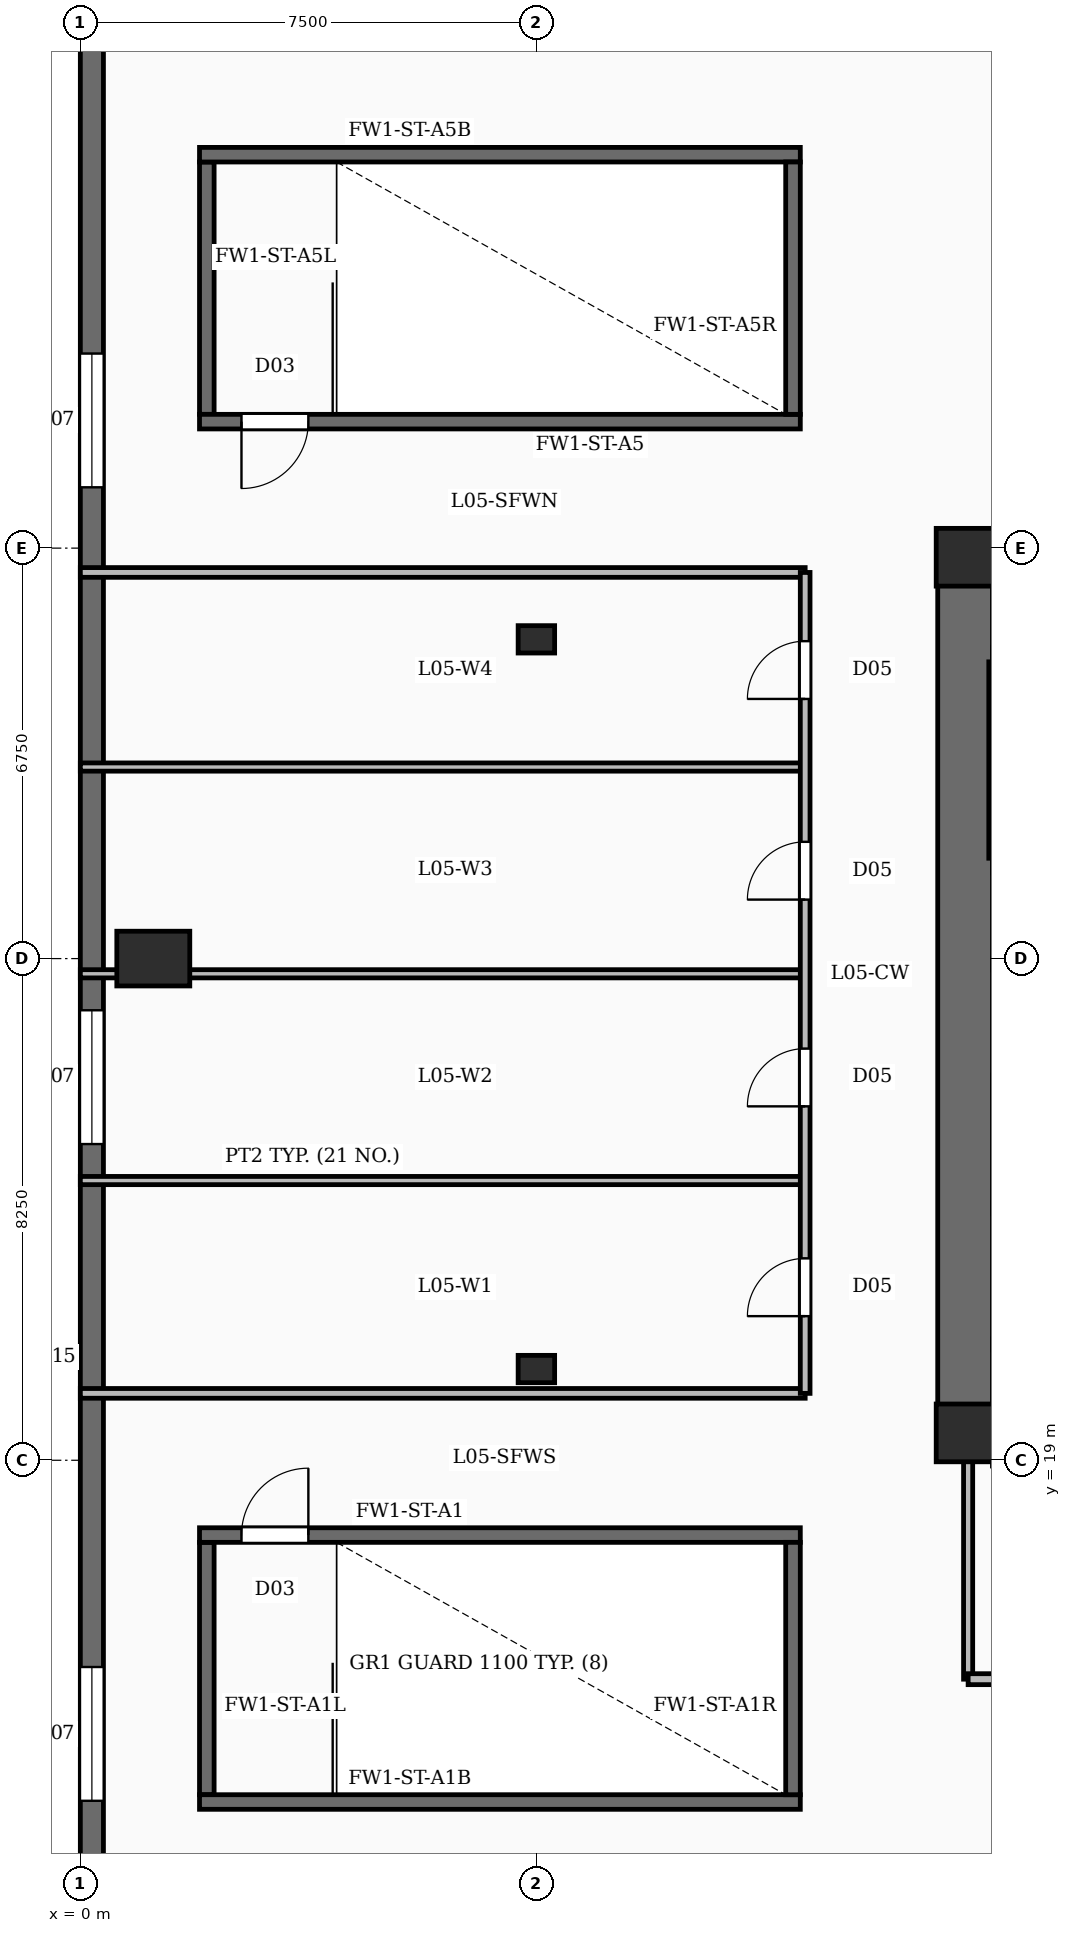
"""IFC4 building model, lengths in metres.
Left out: names, types, materials, properties, quantities, classifications, styles, units other than length and angle.
Written with IfcOpenShell. Run it as: python <this file> out.ifc"""

import sys

from ifc_helpers import new_model, si_unit, direction, frame, frame_2d, origin, origin_2d, place, context, subcontext, project, spatial, rectangle, extrude, element, fill, save


model = new_model("IFC4")
c1 = context("Model", 3, precision=1e-05, world=origin(), true_north=direction((0.0, 1.0)))
c2 = subcontext(c1, "Body", "Model", "MODEL_VIEW")
j1 = project(units=[si_unit("LENGTHUNIT", "METRE"), si_unit("PLANEANGLEUNIT", "RADIAN")], contexts=[c1])
p1 = place(None, origin())
s1 = spatial("IfcSite", under=j1, at=p1, CompositionType="ELEMENT")
p2 = place(p1, origin())
s2 = spatial("IfcBuilding", under=s1, at=p2, CompositionType="ELEMENT")
p3 = place(p2, frame((0.0, 0.0, 28.0)))
s3 = spatial("IfcBuildingStorey", under=s2, at=p3, CompositionType="ELEMENT", Elevation=28.0)
p4 = place(p3, frame((14.55, 19.0, -0.35), z_axis=(0.0, 0.0, 1.0), x_axis=(0.0, 1.0, 0.0)))
e1 = element("IfcWall", 1, at=p4, inside=s3, PredefinedType="SHEAR", context=c2, shape_type="SweptSolid", body=[
    extrude(rectangle(XDim=15.3, YDim=0.9, at=frame_2d((7.65, 0.0))), origin(), (0.0, 0.0, 1.0), 5.9),
])
for number, where, z_axis, x_axis in (
    (2, (14.55, 19.45, -0.35), (0.0, 0.0, 1.0), (1.0, 0.0, 0.0)),
    (3, (14.55, 33.85, -0.35), (0.0, 0.0, 1.0), (1.0, 0.0, 0.0)),
):
    element("IfcColumn", number, at=place(p3, frame(where, z_axis=z_axis, x_axis=x_axis)), inside=s3, PredefinedType="COLUMN", context=c2, shape_type="SweptSolid", body=[
        extrude(rectangle(XDim=0.95, YDim=0.95, at=origin_2d()), origin(), (0.0, 0.0, 1.0), 5.9),
    ])
p5 = place(p3, frame((1.2, 27.25, -0.35), z_axis=(0.0, 0.0, 1.0), x_axis=(1.0, 0.0, 0.0)))
e4 = element("IfcColumn", 4, at=p5, inside=s3, PredefinedType="COLUMN", context=c2, shape_type="SweptSolid", body=[
    extrude(rectangle(XDim=1.2, YDim=0.9, at=origin_2d()), origin(), (0.0, 0.0, 1.0), 5.9),
])
for number, where, z_axis, x_axis in (
    (5, (7.5, 20.5, -0.35), (0.0, 0.0, 1.0), (1.0, 0.0, 0.0)),
    (6, (7.5, 32.5, -0.35), (0.0, 0.0, 1.0), (1.0, 0.0, 0.0)),
):
    element("IfcColumn", number, at=place(p3, frame(where, z_axis=z_axis, x_axis=x_axis)), inside=s3, PredefinedType="PILASTER", context=c2, shape_type="SweptSolid", body=[
        extrude(rectangle(XDim=0.6, YDim=0.45, at=origin_2d()), origin(), (0.0, 0.0, 1.0), 5.9),
    ])
p6 = place(p3, frame((0.19, 5.4, 0.0), z_axis=(0.0, 0.0, 1.0), x_axis=(0.0, 1.0, 0.0)))
e7 = element("IfcWall", 7, at=p6, inside=s3, PredefinedType="SOLIDWALL", context=c2, shape_type="SweptSolid", body=[
    extrude(rectangle(XDim=43.7, YDim=0.38, at=frame_2d((21.85, 0.0))), origin(), (0.0, 0.0, 1.0), 5.55),
])
p7 = place(p6, frame((8.0, 0.0, 0.95)))
e8 = element("IfcOpeningElement", 8, at=p7, cuts=e7, PredefinedType="OPENING", context=c2, shape_type="SweptSolid", body=[
    extrude(rectangle(XDim=2.2, YDim=2.5, at=frame_2d((1.1, 1.25))), frame((0.0, 0.2, 0.0), z_axis=(0.0, -1.0, 0.0), x_axis=(1.0, 0.0, 0.0)), (0.0, 0.0, 1.0), 0.4),
])
p8 = place(p6, frame((18.8, 0.0, 0.95)))
e9 = element("IfcOpeningElement", 9, at=p8, cuts=e7, PredefinedType="OPENING", context=c2, shape_type="SweptSolid", body=[
    extrude(rectangle(XDim=2.2, YDim=2.5, at=frame_2d((1.1, 1.25))), frame((0.0, 0.2, 0.0), z_axis=(0.0, -1.0, 0.0), x_axis=(1.0, 0.0, 0.0)), (0.0, 0.0, 1.0), 0.4),
])
p9 = place(p6, frame((29.6, 0.0, 0.95)))
e10 = element("IfcOpeningElement", 10, at=p9, cuts=e7, PredefinedType="OPENING", context=c2, shape_type="SweptSolid", body=[
    extrude(rectangle(XDim=2.2, YDim=2.5, at=frame_2d((1.1, 1.25))), frame((0.0, 0.2, 0.0), z_axis=(0.0, -1.0, 0.0), x_axis=(1.0, 0.0, 0.0)), (0.0, 0.0, 1.0), 0.4),
])
p10 = place(p3, frame((1.96, 17.77, 0.0), z_axis=(0.0, 0.0, 1.0), x_axis=(1.0, 0.0, 0.0)))
e11 = element("IfcWall", 11, at=p10, inside=s3, PredefinedType="SOLIDWALL", context=c2, shape_type="SweptSolid", body=[
    extrude(rectangle(XDim=9.88, YDim=0.24, at=frame_2d((4.94, 0.0))), origin(), (0.0, 0.0, 1.0), 5.55),
])
p11 = place(p10, frame((0.69, 0.0, 0.0)))
e12 = element("IfcOpeningElement", 12, at=p11, cuts=e11, PredefinedType="OPENING", context=c2, shape_type="SweptSolid", body=[
    extrude(rectangle(XDim=1.1, YDim=2.15, at=frame_2d((0.55, 1.075))), frame((0.0, 0.13, 0.0), z_axis=(0.0, -1.0, 0.0), x_axis=(1.0, 0.0, 0.0)), (0.0, 0.0, 1.0), 0.26),
])
p12 = place(p3, frame((1.96, 13.38, 0.0), z_axis=(0.0, 0.0, 1.0), x_axis=(1.0, 0.0, 0.0)))
e13 = element("IfcWall", 13, at=p12, inside=s3, PredefinedType="SOLIDWALL", context=c2, shape_type="SweptSolid", body=[
    extrude(rectangle(XDim=9.88, YDim=0.24, at=frame_2d((4.94, 0.0))), origin(), (0.0, 0.0, 1.0), 5.55),
])
for number, where, z_axis, x_axis in (
    (14, (2.08, 13.5, 0.0), (0.0, 0.0, 1.0), (0.0, 1.0, 0.0)),
    (15, (11.72, 13.5, 0.0), (0.0, 0.0, 1.0), (0.0, 1.0, 0.0)),
):
    element("IfcWall", number, at=place(p3, frame(where, z_axis=z_axis, x_axis=x_axis)), inside=s3, PredefinedType="SOLIDWALL", context=c2, shape_type="SweptSolid", body=[
        extrude(rectangle(XDim=4.15, YDim=0.24, at=frame_2d((2.075, 0.0))), origin(), (0.0, 0.0, 1.0), 5.55),
    ])
p13 = place(p3, frame((11.84, 36.08, 0.0), z_axis=(0.0, 0.0, 1.0), x_axis=(-1.0, 0.0, 0.0)))
e16 = element("IfcWall", 16, at=p13, inside=s3, PredefinedType="SOLIDWALL", context=c2, shape_type="SweptSolid", body=[
    extrude(rectangle(XDim=9.88, YDim=0.24, at=frame_2d((4.94, 0.0))), origin(), (0.0, 0.0, 1.0), 5.55),
])
p14 = place(p13, frame((8.09, 0.0, 0.0)))
e17 = element("IfcOpeningElement", 17, at=p14, cuts=e16, PredefinedType="OPENING", context=c2, shape_type="SweptSolid", body=[
    extrude(rectangle(XDim=1.1, YDim=2.15, at=frame_2d((0.55, 1.075))), frame((0.0, 0.13, 0.0), z_axis=(0.0, -1.0, 0.0), x_axis=(1.0, 0.0, 0.0)), (0.0, 0.0, 1.0), 0.26),
])
p15 = place(p3, frame((1.96, 40.47, 0.0), z_axis=(0.0, 0.0, 1.0), x_axis=(1.0, 0.0, 0.0)))
e18 = element("IfcWall", 18, at=p15, inside=s3, PredefinedType="SOLIDWALL", context=c2, shape_type="SweptSolid", body=[
    extrude(rectangle(XDim=9.88, YDim=0.24, at=frame_2d((4.94, 0.0))), origin(), (0.0, 0.0, 1.0), 5.55),
])
for number, where, z_axis, x_axis in (
    (19, (2.08, 36.2, 0.0), (0.0, 0.0, 1.0), (0.0, 1.0, 0.0)),
    (20, (11.72, 36.2, 0.0), (0.0, 0.0, 1.0), (0.0, 1.0, 0.0)),
):
    element("IfcWall", number, at=place(p3, frame(where, z_axis=z_axis, x_axis=x_axis)), inside=s3, PredefinedType="SOLIDWALL", context=c2, shape_type="SweptSolid", body=[
        extrude(rectangle(XDim=4.15, YDim=0.24, at=frame_2d((2.075, 0.0))), origin(), (0.0, 0.0, 1.0), 5.55),
    ])
p16 = place(p3, frame((15.06, 28.9, 0.0), z_axis=(0.0, 0.0, 1.0), x_axis=(0.0, 1.0, 0.0)))
e21 = element("IfcWall", 21, at=p16, inside=s3, PredefinedType="SOLIDWALL", context=c2, shape_type="SweptSolid", body=[
    extrude(rectangle(XDim=3.23, YDim=0.24, at=frame_2d((1.615, 0.0))), origin(), (0.0, 0.0, 1.0), 5.55),
])
p17 = place(p3, frame((14.6, 15.4, 0.0), z_axis=(0.0, 0.0, 1.0), x_axis=(1.0, 0.0, 0.0)))
e22 = element("IfcWall", 22, at=p17, inside=s3, PredefinedType="PARTITIONING", context=c2, shape_type="SweptSolid", body=[
    extrude(rectangle(XDim=9.9, YDim=0.18, at=frame_2d((4.95, 0.0))), origin(), (0.0, 0.0, 1.0), 4.61),
])
p18 = place(p17, frame((0.74, 0.0, 0.0)))
e23 = element("IfcOpeningElement", 23, at=p18, cuts=e22, PredefinedType="OPENING", context=c2, shape_type="SweptSolid", body=[
    extrude(rectangle(XDim=0.92, YDim=2.1, at=frame_2d((0.46, 1.05))), frame((0.0, 0.1, 0.0), z_axis=(0.0, -1.0, 0.0), x_axis=(1.0, 0.0, 0.0)), (0.0, 0.0, 1.0), 0.2),
])
p19 = place(p17, frame((3.19, 0.0, 0.0)))
e24 = element("IfcOpeningElement", 24, at=p19, cuts=e22, PredefinedType="OPENING", context=c2, shape_type="SweptSolid", body=[
    extrude(rectangle(XDim=0.92, YDim=2.1, at=frame_2d((0.46, 1.05))), frame((0.0, 0.1, 0.0), z_axis=(0.0, -1.0, 0.0), x_axis=(1.0, 0.0, 0.0)), (0.0, 0.0, 1.0), 0.2),
])
p20 = place(p17, frame((5.69, 0.0, 0.0)))
e25 = element("IfcOpeningElement", 25, at=p20, cuts=e22, PredefinedType="OPENING", context=c2, shape_type="SweptSolid", body=[
    extrude(rectangle(XDim=0.92, YDim=2.1, at=frame_2d((0.46, 1.05))), frame((0.0, 0.1, 0.0), z_axis=(0.0, -1.0, 0.0), x_axis=(1.0, 0.0, 0.0)), (0.0, 0.0, 1.0), 0.2),
])
p21 = place(p17, frame((8.19, 0.0, 0.0)))
e26 = element("IfcOpeningElement", 26, at=p21, cuts=e22, PredefinedType="OPENING", context=c2, shape_type="SweptSolid", body=[
    extrude(rectangle(XDim=0.92, YDim=2.1, at=frame_2d((0.46, 1.05))), frame((0.0, 0.1, 0.0), z_axis=(0.0, -1.0, 0.0), x_axis=(1.0, 0.0, 0.0)), (0.0, 0.0, 1.0), 0.2),
])
p22 = place(p3, frame((14.6, 15.4, 0.0), z_axis=(0.0, 0.0, 1.0), x_axis=(0.0, 1.0, 0.0)))
e27 = element("IfcWall", 27, at=p22, inside=s3, PredefinedType="PARTITIONING", context=c2, shape_type="SweptSolid", body=[
    extrude(rectangle(XDim=3.58, YDim=0.15, at=frame_2d((1.79, 0.0))), origin(), (0.0, 0.0, 1.0), 3.6),
])
for number, where, z_axis, x_axis in (
    (28, (0.0, 23.6, 0.0), (0.0, 0.0, 1.0), (1.0, 0.0, 0.0)),
    (29, (0.0, 27.0, 0.0), (0.0, 0.0, 1.0), (1.0, 0.0, 0.0)),
    (30, (0.0, 30.4, 0.0), (0.0, 0.0, 1.0), (1.0, 0.0, 0.0)),
):
    element("IfcWall", number, at=place(p3, frame(where, z_axis=z_axis, x_axis=x_axis)), inside=s3, PredefinedType="PARTITIONING", context=c2, shape_type="SweptSolid", body=[
        extrude(rectangle(XDim=11.92, YDim=0.135, at=frame_2d((5.96, 0.0))), origin(), (0.0, 0.0, 1.0), 4.61),
    ])
p23 = place(p3, frame((11.92, 20.1, 0.0), z_axis=(0.0, 0.0, 1.0), x_axis=(0.0, 1.0, 0.0)))
e31 = element("IfcWall", 31, at=p23, inside=s3, PredefinedType="PARTITIONING", context=c2, shape_type="SweptSolid", body=[
    extrude(rectangle(XDim=13.5, YDim=0.16, at=frame_2d((6.75, 0.0))), origin(), (0.0, 0.0, 1.0), 4.61),
])
p24 = place(p23, frame((1.27, 0.0, 0.0)))
e32 = element("IfcOpeningElement", 32, at=p24, cuts=e31, PredefinedType="OPENING", context=c2, shape_type="SweptSolid", body=[
    extrude(rectangle(XDim=0.95, YDim=2.15, at=frame_2d((0.475, 1.075))), frame((0.0, 0.09, 0.0), z_axis=(0.0, -1.0, 0.0), x_axis=(1.0, 0.0, 0.0)), (0.0, 0.0, 1.0), 0.18),
])
p25 = place(p23, frame((4.72, 0.0, 0.0)))
e33 = element("IfcOpeningElement", 33, at=p25, cuts=e31, PredefinedType="OPENING", context=c2, shape_type="SweptSolid", body=[
    extrude(rectangle(XDim=0.95, YDim=2.15, at=frame_2d((0.475, 1.075))), frame((0.0, 0.09, 0.0), z_axis=(0.0, -1.0, 0.0), x_axis=(1.0, 0.0, 0.0)), (0.0, 0.0, 1.0), 0.18),
])
p26 = place(p23, frame((8.12, 0.0, 0.0)))
e34 = element("IfcOpeningElement", 34, at=p26, cuts=e31, PredefinedType="OPENING", context=c2, shape_type="SweptSolid", body=[
    extrude(rectangle(XDim=0.95, YDim=2.15, at=frame_2d((0.475, 1.075))), frame((0.0, 0.09, 0.0), z_axis=(0.0, -1.0, 0.0), x_axis=(1.0, 0.0, 0.0)), (0.0, 0.0, 1.0), 0.18),
])
p27 = place(p23, frame((11.42, 0.0, 0.0)))
e35 = element("IfcOpeningElement", 35, at=p27, cuts=e31, PredefinedType="OPENING", context=c2, shape_type="SweptSolid", body=[
    extrude(rectangle(XDim=0.95, YDim=2.15, at=frame_2d((0.475, 1.075))), frame((0.0, 0.09, 0.0), z_axis=(0.0, -1.0, 0.0), x_axis=(1.0, 0.0, 0.0)), (0.0, 0.0, 1.0), 0.18),
])
p28 = place(p3, frame((0.0, 20.1, 0.0), z_axis=(0.0, 0.0, 1.0), x_axis=(1.0, 0.0, 0.0)))
e36 = element("IfcWall", 36, at=p28, inside=s3, PredefinedType="PARTITIONING", context=c2, shape_type="SweptSolid", body=[
    extrude(rectangle(XDim=11.92, YDim=0.16, at=frame_2d((5.96, 0.0))), origin(), (0.0, 0.0, 1.0), 3.6),
])
p29 = place(p3, frame((0.0, 33.6, 0.0), z_axis=(0.0, 0.0, 1.0), x_axis=(1.0, 0.0, 0.0)))
e37 = element("IfcWall", 37, at=p29, inside=s3, PredefinedType="PARTITIONING", context=c2, shape_type="SweptSolid", body=[
    extrude(rectangle(XDim=11.92, YDim=0.16, at=frame_2d((5.96, 0.0))), origin(), (0.0, 0.0, 1.0), 4.61),
])
p30 = place(p7, origin())
e38 = element("IfcWindow", 38, at=p30, inside=s3, PartitioningType="DOUBLE_PANEL_VERTICAL", PredefinedType="WINDOW", context=c2, shape_type="SweptSolid", body=[
    extrude(rectangle(XDim=2.2, YDim=2.5, at=frame_2d((1.1, 1.25))), frame((0.0, 0.03, 0.0), z_axis=(0.0, -1.0, 0.0), x_axis=(1.0, 0.0, 0.0)), (0.0, 0.0, 1.0), 0.06),
])
fill(e8, e38)
p31 = place(p8, origin())
e39 = element("IfcWindow", 39, at=p31, inside=s3, PartitioningType="DOUBLE_PANEL_VERTICAL", PredefinedType="WINDOW", context=c2, shape_type="SweptSolid", body=[
    extrude(rectangle(XDim=2.2, YDim=2.5, at=frame_2d((1.1, 1.25))), frame((0.0, 0.03, 0.0), z_axis=(0.0, -1.0, 0.0), x_axis=(1.0, 0.0, 0.0)), (0.0, 0.0, 1.0), 0.06),
])
fill(e9, e39)
p32 = place(p9, origin())
e40 = element("IfcWindow", 40, at=p32, inside=s3, PartitioningType="DOUBLE_PANEL_VERTICAL", PredefinedType="WINDOW", context=c2, shape_type="SweptSolid", body=[
    extrude(rectangle(XDim=2.2, YDim=2.5, at=frame_2d((1.1, 1.25))), frame((0.0, 0.03, 0.0), z_axis=(0.0, -1.0, 0.0), x_axis=(1.0, 0.0, 0.0)), (0.0, 0.0, 1.0), 0.06),
])
fill(e10, e40)
p33 = place(p11, origin())
e41 = element("IfcDoor", 41, at=p33, inside=s3, OperationType="SINGLE_SWING_RIGHT", PredefinedType="DOOR", context=c2, shape_type="SweptSolid", body=[
    extrude(rectangle(XDim=1.1, YDim=2.15, at=frame_2d((0.55, 1.075))), frame((0.0, 0.025, 0.0), z_axis=(0.0, -1.0, 0.0), x_axis=(1.0, 0.0, 0.0)), (0.0, 0.0, 1.0), 0.05),
])
fill(e12, e41)
p34 = place(p14, origin())
e42 = element("IfcDoor", 42, at=p34, inside=s3, OperationType="SINGLE_SWING_RIGHT", PredefinedType="DOOR", context=c2, shape_type="SweptSolid", body=[
    extrude(rectangle(XDim=1.1, YDim=2.15, at=frame_2d((0.55, 1.075))), frame((0.0, 0.025, 0.0), z_axis=(0.0, -1.0, 0.0), x_axis=(1.0, 0.0, 0.0)), (0.0, 0.0, 1.0), 0.05),
])
fill(e17, e42)
p35 = place(p24, origin())
e43 = element("IfcDoor", 43, at=p35, inside=s3, OperationType="SINGLE_SWING_LEFT", PredefinedType="DOOR", context=c2, shape_type="SweptSolid", body=[
    extrude(rectangle(XDim=0.95, YDim=2.15, at=frame_2d((0.475, 1.075))), frame((0.0, 0.025, 0.0), z_axis=(0.0, -1.0, 0.0), x_axis=(1.0, 0.0, 0.0)), (0.0, 0.0, 1.0), 0.05),
])
fill(e32, e43)
p36 = place(p25, origin())
e44 = element("IfcDoor", 44, at=p36, inside=s3, OperationType="SINGLE_SWING_LEFT", PredefinedType="DOOR", context=c2, shape_type="SweptSolid", body=[
    extrude(rectangle(XDim=0.95, YDim=2.15, at=frame_2d((0.475, 1.075))), frame((0.0, 0.025, 0.0), z_axis=(0.0, -1.0, 0.0), x_axis=(1.0, 0.0, 0.0)), (0.0, 0.0, 1.0), 0.05),
])
fill(e33, e44)
p37 = place(p26, origin())
e45 = element("IfcDoor", 45, at=p37, inside=s3, OperationType="SINGLE_SWING_LEFT", PredefinedType="DOOR", context=c2, shape_type="SweptSolid", body=[
    extrude(rectangle(XDim=0.95, YDim=2.15, at=frame_2d((0.475, 1.075))), frame((0.0, 0.025, 0.0), z_axis=(0.0, -1.0, 0.0), x_axis=(1.0, 0.0, 0.0)), (0.0, 0.0, 1.0), 0.05),
])
fill(e34, e45)
p38 = place(p27, origin())
e46 = element("IfcDoor", 46, at=p38, inside=s3, OperationType="SINGLE_SWING_LEFT", PredefinedType="DOOR", context=c2, shape_type="SweptSolid", body=[
    extrude(rectangle(XDim=0.95, YDim=2.15, at=frame_2d((0.475, 1.075))), frame((0.0, 0.025, 0.0), z_axis=(0.0, -1.0, 0.0), x_axis=(1.0, 0.0, 0.0)), (0.0, 0.0, 1.0), 0.05),
])
fill(e35, e46)
save(model, sys.argv[1])
